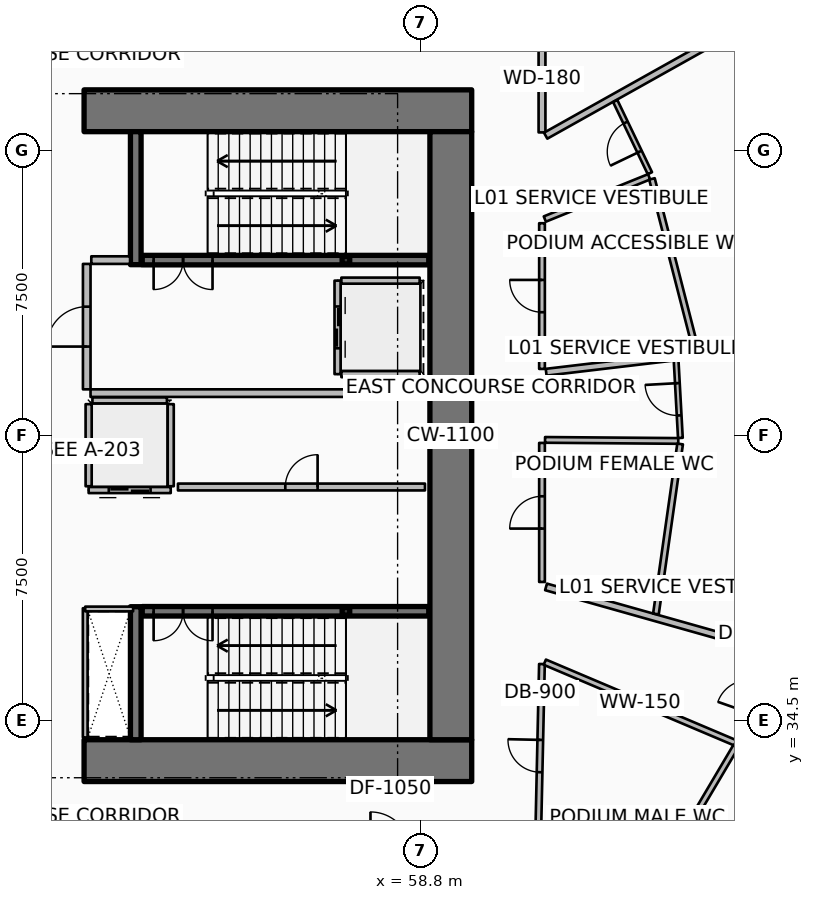
"""IFC4 building model, lengths in metres.
Left out: names, types, materials, properties, quantities, classifications, styles, units other than length and angle.
Written with IfcOpenShell. Run it as: python <this file> out.ifc"""

import sys

from ifc_helpers import new_model, si_unit, direction, frame, frame_2d, origin, origin_2d, place, context, subcontext, project, spatial, rectangle, hollow_rectangle, extrude, element, fill, save


model = new_model("IFC4")
c1 = context("Model", 3, precision=1e-05, world=origin(), true_north=direction((0.0, 1.0)))
c2 = subcontext(c1, "Body", "Model", "MODEL_VIEW")
j1 = project(units=[si_unit("LENGTHUNIT", "METRE"), si_unit("PLANEANGLEUNIT", "RADIAN")], contexts=[c1])
p1 = place(None, origin())
s1 = spatial("IfcSite", under=j1, at=p1, CompositionType="ELEMENT")
p2 = place(p1, origin())
s2 = spatial("IfcBuilding", under=s1, at=p2, CompositionType="ELEMENT")
p3 = place(p2, frame((0.0, 0.0, 7.2)))
s3 = spatial("IfcBuildingStorey", under=s2, at=p3, CompositionType="ELEMENT", Elevation=7.2)
for number, where, z_axis, x_axis in (
    (1, (49.95, 33.45, 0.0), (0.0, 0.0, 1.0), (1.0, 0.0, 0.0)),
    (2, (49.95, 50.55, 0.0), (0.0, 0.0, 1.0), (1.0, 0.0, 0.0)),
):
    element("IfcWall", number, at=place(p3, frame(where, z_axis=z_axis, x_axis=x_axis)), inside=s3, PredefinedType="SHEAR", context=c2, shape_type="SweptSolid", body=[
        extrude(rectangle(XDim=10.2, YDim=1.1, at=frame_2d((5.1, 0.0))), origin(), (0.0, 0.0, 1.0), 4.8),
    ])
p4 = place(p3, frame((59.6, 34.0, 0.0), z_axis=(0.0, 0.0, 1.0), x_axis=(0.0, 1.0, 0.0)))
e3 = element("IfcWall", 3, at=p4, inside=s3, PredefinedType="SHEAR", context=c2, shape_type="SweptSolid", body=[
    extrude(rectangle(XDim=16.0, YDim=1.1, at=frame_2d((8.0, 0.0))), origin(), (0.0, 0.0, 1.0), 4.8),
])
for number, where, z_axis, x_axis in (
    (4, (51.31, 46.5, 0.0), (0.0, 0.0, 1.0), (0.0, 1.0, 0.0)),
    (5, (51.31, 34.0, 0.0), (0.0, 0.0, 1.0), (0.0, 1.0, 0.0)),
):
    element("IfcWall", number, at=place(p3, frame(where, z_axis=z_axis, x_axis=x_axis)), inside=s3, PredefinedType="SHEAR", context=c2, shape_type="SweptSolid", body=[
        extrude(rectangle(XDim=3.5, YDim=0.28, at=frame_2d((1.75, 0.0))), origin(), (0.0, 0.0, 1.0), 4.8),
    ])
for number, where, z_axis, x_axis in (
    (6, (56.84, 46.62, 0.0), (0.0, 0.0, 1.0), (1.0, 0.0, 0.0)),
    (7, (56.84, 37.38, 0.0), (0.0, 0.0, 1.0), (1.0, 0.0, 0.0)),
):
    element("IfcColumn", number, at=place(p3, frame(where, z_axis=z_axis, x_axis=x_axis)), inside=s3, PredefinedType="COLUMN", context=c2, shape_type="SweptSolid", body=[
        extrude(hollow_rectangle(XDim=0.2, YDim=0.2, WallThickness=0.01, InnerFilletRadius=0.01, OuterFilletRadius=0.02, at=origin_2d()), origin(), (0.0, 0.0, 1.0), 2.195),
    ])
p5 = place(p3, frame((51.48, 46.62, 0.0), z_axis=(0.0, 0.0, 1.0), x_axis=(1.0, 0.0, 0.0)))
e8 = element("IfcWall", 8, at=p5, inside=s3, PredefinedType="SOLIDWALL", context=c2, shape_type="SweptSolid", body=[
    extrude(rectangle(XDim=7.54, YDim=0.25, at=frame_2d((3.77, 0.0))), origin(), (0.0, 0.0, 1.0), 4.48),
])
p6 = place(p5, frame((0.3, 0.0, 0.0)))
e9 = element("IfcOpeningElement", 9, at=p6, cuts=e8, PredefinedType="OPENING", context=c2, shape_type="SweptSolid", body=[
    extrude(rectangle(XDim=1.55, YDim=2.15, at=frame_2d((0.775, 1.075))), frame((0.0, 0.135, 0.0), z_axis=(0.0, -1.0, 0.0), x_axis=(1.0, 0.0, 0.0)), (0.0, 0.0, 1.0), 0.27),
])
p7 = place(p3, frame((51.48, 37.38, 0.0), z_axis=(0.0, 0.0, 1.0), x_axis=(1.0, 0.0, 0.0)))
e10 = element("IfcWall", 10, at=p7, inside=s3, PredefinedType="SOLIDWALL", context=c2, shape_type="SweptSolid", body=[
    extrude(rectangle(XDim=7.54, YDim=0.25, at=frame_2d((3.77, 0.0))), origin(), (0.0, 0.0, 1.0), 4.48),
])
p8 = place(p7, frame((0.3, 0.0, 0.0)))
e11 = element("IfcOpeningElement", 11, at=p8, cuts=e10, PredefinedType="OPENING", context=c2, shape_type="SweptSolid", body=[
    extrude(rectangle(XDim=1.55, YDim=2.15, at=frame_2d((0.775, 1.075))), frame((0.0, 0.135, 0.0), z_axis=(0.0, -1.0, 0.0), x_axis=(1.0, 0.0, 0.0)), (0.0, 0.0, 1.0), 0.27),
])
p9 = place(p3, frame((56.62, 46.08, 0.0), z_axis=(0.0, 0.0, 1.0), x_axis=(0.0, -1.0, 0.0)))
e12 = element("IfcWall", 12, at=p9, inside=s3, PredefinedType="PARTITIONING", context=c2, shape_type="SweptSolid", body=[
    extrude(rectangle(XDim=2.46, YDim=0.16, at=frame_2d((1.23, 0.0))), origin(), (0.0, 0.0, 1.0), 4.48),
])
p10 = place(p9, frame((0.68, 0.0, 0.0)))
e13 = element("IfcOpeningElement", 13, at=p10, cuts=e12, PredefinedType="OPENING", context=c2, shape_type="SweptSolid", body=[
    extrude(rectangle(XDim=1.1, YDim=2.1, at=frame_2d((0.55, 1.05))), frame((0.0, 0.09, 0.0), z_axis=(0.0, -1.0, 0.0), x_axis=(1.0, 0.0, 0.0)), (0.0, 0.0, 1.0), 0.18),
])
for number, where, z_axis, x_axis in (
    (14, (56.72, 46.08, 0.0), (0.0, 0.0, 1.0), (1.0, 0.0, 0.0)),
    (15, (56.72, 43.62, 0.0), (0.0, 0.0, 1.0), (1.0, 0.0, 0.0)),
):
    element("IfcWall", number, at=place(p3, frame(where, z_axis=z_axis, x_axis=x_axis)), inside=s3, PredefinedType="PARTITIONING", context=c2, shape_type="SweptSolid", body=[
        extrude(rectangle(XDim=2.06, YDim=0.16, at=frame_2d((1.03, 0.0))), origin(), (0.0, 0.0, 1.0), 4.48),
    ])
p11 = place(p3, frame((52.23, 40.57, 0.0), z_axis=(0.0, 0.0, 1.0), x_axis=(-1.0, 0.0, 0.0)))
e16 = element("IfcWall", 16, at=p11, inside=s3, PredefinedType="PARTITIONING", context=c2, shape_type="SweptSolid", body=[
    extrude(rectangle(XDim=2.16, YDim=0.16, at=frame_2d((1.08, 0.0))), origin(), (0.0, 0.0, 1.0), 4.48),
])
p12 = place(p11, frame((0.53, 0.0, 0.0)))
e17 = element("IfcOpeningElement", 17, at=p12, cuts=e16, PredefinedType="OPENING", context=c2, shape_type="SweptSolid", body=[
    extrude(rectangle(XDim=1.1, YDim=2.1, at=frame_2d((0.55, 1.05))), frame((0.0, 0.09, 0.0), z_axis=(0.0, -1.0, 0.0), x_axis=(1.0, 0.0, 0.0)), (0.0, 0.0, 1.0), 0.18),
])
for number, where, z_axis, x_axis in (
    (18, (52.23, 40.67, 0.0), (0.0, 0.0, 1.0), (0.0, 1.0, 0.0)),
    (19, (50.07, 40.67, 0.0), (0.0, 0.0, 1.0), (0.0, 1.0, 0.0)),
):
    element("IfcWall", number, at=place(p3, frame(where, z_axis=z_axis, x_axis=x_axis)), inside=s3, PredefinedType="PARTITIONING", context=c2, shape_type="SweptSolid", body=[
        extrude(rectangle(XDim=2.16, YDim=0.16, at=frame_2d((1.08, 0.0))), origin(), (0.0, 0.0, 1.0), 4.48),
    ])
p13 = place(p3, frame((50.17, 42.93, 0.0), z_axis=(0.0, 0.0, 1.0), x_axis=(1.0, 0.0, 0.0)))
e20 = element("IfcWall", 20, at=p13, inside=s3, PredefinedType="PARTITIONING", context=c2, shape_type="SweptSolid", body=[
    extrude(rectangle(XDim=1.96, YDim=0.16, at=frame_2d((0.98, 0.0))), origin(), (0.0, 0.0, 1.0), 4.48),
])
p14 = place(p3, frame((52.42, 40.65, 0.0), z_axis=(0.0, 0.0, 1.0), x_axis=(1.0, 0.0, 0.0)))
e21 = element("IfcWall", 21, at=p14, inside=s3, PredefinedType="PARTITIONING", context=c2, shape_type="SweptSolid", body=[
    extrude(rectangle(XDim=6.5, YDim=0.18, at=frame_2d((3.25, 0.0))), origin(), (0.0, 0.0, 1.0), 4.48),
])
p15 = place(p14, frame((2.825, 0.0, 0.0)))
e22 = element("IfcOpeningElement", 22, at=p15, cuts=e21, PredefinedType="OPENING", context=c2, shape_type="SweptSolid", body=[
    extrude(rectangle(XDim=0.85, YDim=2.06, at=frame_2d((0.425, 1.03))), frame((0.0, 0.1, 0.0), z_axis=(0.0, -1.0, 0.0), x_axis=(1.0, 0.0, 0.0)), (0.0, 0.0, 1.0), 0.2),
])
p16 = place(p3, frame((50.12, 43.12, 0.0), z_axis=(0.0, 0.0, 1.0), x_axis=(1.0, 0.0, 0.0)))
e23 = element("IfcWall", 23, at=p16, inside=s3, PredefinedType="PARTITIONING", context=c2, shape_type="SweptSolid", body=[
    extrude(rectangle(XDim=8.88, YDim=0.2, at=frame_2d((4.44, 0.0))), origin(), (0.0, 0.0, 1.0), 4.48),
])
p17 = place(p3, frame((50.14, 46.62, 0.0), z_axis=(0.0, 0.0, 1.0), x_axis=(1.0, 0.0, 0.0)))
e24 = element("IfcWall", 24, at=p17, inside=s3, PredefinedType="PARTITIONING", context=c2, shape_type="SweptSolid", body=[
    extrude(rectangle(XDim=1.02, YDim=0.2, at=frame_2d((0.51, 0.0))), origin(), (0.0, 0.0, 1.0), 4.48),
])
p18 = place(p3, frame((50.02, 43.22, 0.0), z_axis=(0.0, 0.0, 1.0), x_axis=(0.0, 1.0, 0.0)))
e25 = element("IfcWall", 25, at=p18, inside=s3, PredefinedType="PARTITIONING", context=c2, shape_type="SweptSolid", body=[
    extrude(rectangle(XDim=3.3, YDim=0.2, at=frame_2d((1.65, 0.0))), origin(), (0.0, 0.0, 1.0), 4.48),
])
p19 = place(p18, frame((1.125, 0.0, 0.0)))
e26 = element("IfcOpeningElement", 26, at=p19, cuts=e25, PredefinedType="OPENING", context=c2, shape_type="SweptSolid", body=[
    extrude(rectangle(XDim=1.05, YDim=2.1, at=frame_2d((0.525, 1.05))), frame((0.0, 0.11, 0.0), z_axis=(0.0, -1.0, 0.0), x_axis=(1.0, 0.0, 0.0)), (0.0, 0.0, 1.0), 0.22),
])
p20 = place(p3, frame((49.98, 34.06, 0.0), z_axis=(0.0, 0.0, 1.0), x_axis=(0.0, 1.0, 0.0)))
e27 = element("IfcWall", 27, at=p20, inside=s3, PredefinedType="PARTITIONING", context=c2, shape_type="SweptSolid", body=[
    extrude(rectangle(XDim=3.4, YDim=0.125, at=frame_2d((1.7, 0.0))), origin(), (0.0, 0.0, 1.0), 3.92),
])
p21 = place(p3, frame((49.98, 37.44, 0.0), z_axis=(0.0, 0.0, 1.0), x_axis=(1.0, 0.0, 0.0)))
e28 = element("IfcWall", 28, at=p21, inside=s3, PredefinedType="PARTITIONING", context=c2, shape_type="SweptSolid", body=[
    extrude(rectangle(XDim=1.26, YDim=0.125, at=frame_2d((0.63, 0.0))), origin(), (0.0, 0.0, 1.0), 3.92),
])
p22 = place(p3, frame((62.0, 49.98, 0.0), z_axis=(0.0, 0.0, 1.0), x_axis=(0.0, 1.0, 0.0)))
e29 = element("IfcWall", 29, at=p22, inside=s3, PredefinedType="PARTITIONING", context=c2, shape_type="SweptSolid", body=[
    extrude(rectangle(XDim=2.83, YDim=0.18, at=frame_2d((1.415, 0.0))), origin(), (0.0, 0.0, 1.0), 3.693),
])
p23 = place(p3, frame((62.096, 49.894, 0.0), z_axis=(0.0, 0.0, 1.0), x_axis=(0.872490608205, 0.488630881744, 0.0)))
e30 = element("IfcWall", 30, at=p23, inside=s3, PredefinedType="PARTITIONING", context=c2, shape_type="SweptSolid", body=[
    extrude(rectangle(XDim=19.185, YDim=0.18, at=frame_2d((9.592, 0.0))), origin(), (0.0, 0.0, 1.0), 3.693),
])
p24 = place(p3, frame((61.892, 31.15, 0.0), z_axis=(0.0, 0.0, 1.0), x_axis=(0.021928973177, 0.999759531155, 0.0)))
e31 = element("IfcWall", 31, at=p24, inside=s3, PredefinedType="PARTITIONING", context=c2, shape_type="SweptSolid", body=[
    extrude(rectangle(XDim=4.843, YDim=0.15, at=frame_2d((2.421, 0.0))), origin(), (0.0, 0.0, 1.0), 3.693),
])
p25 = place(p24, frame((1.997, 0.0, 0.0)))
e32 = element("IfcOpeningElement", 32, at=p25, cuts=e31, PredefinedType="OPENING", context=c2, shape_type="SweptSolid", body=[
    extrude(rectangle(XDim=0.85, YDim=2.06, at=frame_2d((0.425, 1.03))), frame((0.0, 0.085, 0.0), z_axis=(0.0, -1.0, 0.0), x_axis=(1.0, 0.0, 0.0)), (0.0, 0.0, 1.0), 0.17),
])
p26 = place(p3, frame((62.074, 36.041, 0.0), z_axis=(0.0, 0.0, 1.0), x_axis=(0.920841540816, -0.38993699069, 0.0)))
e33 = element("IfcWall", 33, at=p26, inside=s3, PredefinedType="PARTITIONING", context=c2, shape_type="SweptSolid", body=[
    extrude(rectangle(XDim=5.443, YDim=0.15, at=frame_2d((2.722, 0.0))), origin(), (0.0, 0.0, 1.0), 3.92),
])
p27 = place(p3, frame((64.375, 29.217, 0.0), z_axis=(0.0, 0.0, 1.0), x_axis=(0.509047270842, 0.860738564286, 0.0)))
e34 = element("IfcWall", 34, at=p27, inside=s3, PredefinedType="PARTITIONING", context=c2, shape_type="SweptSolid", body=[
    extrude(rectangle(XDim=5.354, YDim=0.15, at=frame_2d((2.677, 0.0))), origin(), (0.0, 0.0, 1.0), 3.693),
])
p28 = place(p3, frame((62.106, 38.022, 0.0), z_axis=(0.0, 0.0, 1.0), x_axis=(0.962455233657, -0.271440459782, 0.0)))
e35 = element("IfcWall", 35, at=p28, inside=s3, PredefinedType="PARTITIONING", context=c2, shape_type="SweptSolid", body=[
    extrude(rectangle(XDim=19.716, YDim=0.18, at=frame_2d((9.858, 0.0))), origin(), (0.0, 0.0, 1.0), 3.693),
])
p29 = place(p3, frame((62.0, 38.152, 0.0), z_axis=(0.0, 0.0, 1.0), x_axis=(0.0, 1.0, 0.0)))
e36 = element("IfcWall", 36, at=p29, inside=s3, PredefinedType="PARTITIONING", context=c2, shape_type="SweptSolid", body=[
    extrude(rectangle(XDim=3.658, YDim=0.15, at=frame_2d((1.829, 0.0))), origin(), (0.0, 0.0, 1.0), 3.693),
])
p30 = place(p29, frame((1.404, 0.0, 0.0)))
e37 = element("IfcOpeningElement", 37, at=p30, cuts=e36, PredefinedType="OPENING", context=c2, shape_type="SweptSolid", body=[
    extrude(rectangle(XDim=0.85, YDim=2.06, at=frame_2d((0.425, 1.03))), frame((0.0, 0.085, 0.0), z_axis=(0.0, -1.0, 0.0), x_axis=(1.0, 0.0, 0.0)), (0.0, 0.0, 1.0), 0.17),
])
p31 = place(p3, frame((62.08, 41.889, 0.0), z_axis=(0.0, 0.0, 1.0), x_axis=(0.999969031596, -0.007869933178, 0.0)))
e38 = element("IfcWall", 38, at=p31, inside=s3, PredefinedType="PARTITIONING", context=c2, shape_type="SweptSolid", body=[
    extrude(rectangle(XDim=3.505, YDim=0.15, at=frame_2d((1.753, 0.0))), origin(), (0.0, 0.0, 1.0), 3.92),
])
p32 = place(p3, frame((64.998, 37.309, 0.0), z_axis=(0.0, 0.0, 1.0), x_axis=(0.140922059176, 0.990020693338, 0.0)))
e39 = element("IfcWall", 39, at=p32, inside=s3, PredefinedType="PARTITIONING", context=c2, shape_type="SweptSolid", body=[
    extrude(rectangle(XDim=4.518, YDim=0.15, at=frame_2d((2.259, 0.0))), origin(), (0.0, 0.0, 1.0), 3.693),
])
p33 = place(p3, frame((65.641, 41.941, 0.0), z_axis=(0.0, 0.0, 1.0), x_axis=(-0.054918793983, 0.998490824228, 0.0)))
e40 = element("IfcWall", 40, at=p33, inside=s3, PredefinedType="PARTITIONING", context=c2, shape_type="SweptSolid", body=[
    extrude(rectangle(XDim=2.036, YDim=0.125, at=frame_2d((1.018, 0.0))), origin(), (0.0, 0.0, 1.0), 3.693),
])
p34 = place(p33, frame((0.593, 0.0, 0.0)))
e41 = element("IfcOpeningElement", 41, at=p34, cuts=e40, PredefinedType="OPENING", context=c2, shape_type="SweptSolid", body=[
    extrude(rectangle(XDim=0.85, YDim=2.06, at=frame_2d((0.425, 1.03))), frame((0.0, 0.073, 0.0), z_axis=(0.0, -1.0, 0.0), x_axis=(1.0, 0.0, 0.0)), (0.0, 0.0, 1.0), 0.145),
])
p35 = place(p3, frame((62.109, 43.67, 0.0), z_axis=(0.0, 0.0, 1.0), x_axis=(0.993068665713, 0.117535633659, 0.0)))
e42 = element("IfcWall", 42, at=p35, inside=s3, PredefinedType="PARTITIONING", context=c2, shape_type="SweptSolid", body=[
    extrude(rectangle(XDim=21.133, YDim=0.18, at=frame_2d((10.566, 0.0))), origin(), (0.0, 0.0, 1.0), 3.693),
])
p36 = place(p3, frame((62.0, 43.757, 0.0), z_axis=(0.0, 0.0, 1.0), x_axis=(0.0, 1.0, 0.0)))
e43 = element("IfcWall", 43, at=p36, inside=s3, PredefinedType="PARTITIONING", context=c2, shape_type="SweptSolid", body=[
    extrude(rectangle(XDim=3.833, YDim=0.15, at=frame_2d((1.917, 0.0))), origin(), (0.0, 0.0, 1.0), 3.693),
])
p37 = place(p36, frame((1.492, 0.0, 0.0)))
e44 = element("IfcOpeningElement", 44, at=p37, cuts=e43, PredefinedType="OPENING", context=c2, shape_type="SweptSolid", body=[
    extrude(rectangle(XDim=0.85, YDim=2.06, at=frame_2d((0.425, 1.03))), frame((0.0, 0.085, 0.0), z_axis=(0.0, -1.0, 0.0), x_axis=(1.0, 0.0, 0.0)), (0.0, 0.0, 1.0), 0.17),
])
p38 = place(p3, frame((62.074, 47.701, 0.0), z_axis=(0.0, 0.0, 1.0), x_axis=(0.926852538468, 0.375425587747, 0.0)))
e45 = element("IfcWall", 45, at=p38, inside=s3, PredefinedType="PARTITIONING", context=c2, shape_type="SweptSolid", body=[
    extrude(rectangle(XDim=2.96, YDim=0.15, at=frame_2d((1.48, 0.0))), origin(), (0.0, 0.0, 1.0), 3.92),
])
p39 = place(p3, frame((66.054, 44.237, 0.0), z_axis=(0.0, 0.0, 1.0), x_axis=(-0.248710144761, 0.968577959636, 0.0)))
e46 = element("IfcWall", 46, at=p39, inside=s3, PredefinedType="PARTITIONING", context=c2, shape_type="SweptSolid", body=[
    extrude(rectangle(XDim=4.667, YDim=0.15, at=frame_2d((2.333, 0.0))), origin(), (0.0, 0.0, 1.0), 3.693),
])
p40 = place(p3, frame((64.839, 48.906, 0.0), z_axis=(0.0, 0.0, 1.0), x_axis=(-0.432923235959, 0.901430791446, 0.0)))
e47 = element("IfcWall", 47, at=p40, inside=s3, PredefinedType="PARTITIONING", context=c2, shape_type="SweptSolid", body=[
    extrude(rectangle(XDim=2.106, YDim=0.125, at=frame_2d((1.053, 0.0))), origin(), (0.0, 0.0, 1.0), 3.693),
])
p41 = place(p40, frame((0.628, 0.0, 0.0)))
e48 = element("IfcOpeningElement", 48, at=p41, cuts=e47, PredefinedType="OPENING", context=c2, shape_type="SweptSolid", body=[
    extrude(rectangle(XDim=0.85, YDim=2.06, at=frame_2d((0.425, 1.03))), frame((0.0, 0.073, 0.0), z_axis=(0.0, -1.0, 0.0), x_axis=(1.0, 0.0, 0.0)), (0.0, 0.0, 1.0), 0.145),
])
p42 = place(p6, origin())
e49 = element("IfcDoor", 49, at=p42, inside=s3, OperationType="DOUBLE_DOOR_SINGLE_SWING", PredefinedType="DOOR", context=c2, shape_type="SweptSolid", body=[
    extrude(rectangle(XDim=1.55, YDim=2.15, at=frame_2d((0.775, 1.075))), frame((0.0, 0.025, 0.0), z_axis=(0.0, -1.0, 0.0), x_axis=(1.0, 0.0, 0.0)), (0.0, 0.0, 1.0), 0.05),
])
fill(e9, e49)
p43 = place(p8, origin())
e50 = element("IfcDoor", 50, at=p43, inside=s3, OperationType="DOUBLE_DOOR_SINGLE_SWING", PredefinedType="DOOR", context=c2, shape_type="SweptSolid", body=[
    extrude(rectangle(XDim=1.55, YDim=2.15, at=frame_2d((0.775, 1.075))), frame((0.0, 0.025, 0.0), z_axis=(0.0, -1.0, 0.0), x_axis=(1.0, 0.0, 0.0)), (0.0, 0.0, 1.0), 0.05),
])
fill(e11, e50)
p44 = place(p10, origin())
e51 = element("IfcDoor", 51, at=p44, inside=s3, OperationType="DOUBLE_DOOR_SLIDING", PredefinedType="DOOR", context=c2, shape_type="SweptSolid", body=[
    extrude(rectangle(XDim=1.1, YDim=2.1, at=frame_2d((0.55, 1.05))), frame((0.0, 0.025, 0.0), z_axis=(0.0, -1.0, 0.0), x_axis=(1.0, 0.0, 0.0)), (0.0, 0.0, 1.0), 0.05),
])
fill(e13, e51)
p45 = place(p12, origin())
e52 = element("IfcDoor", 52, at=p45, inside=s3, OperationType="DOUBLE_DOOR_SLIDING", PredefinedType="DOOR", context=c2, shape_type="SweptSolid", body=[
    extrude(rectangle(XDim=1.1, YDim=2.1, at=frame_2d((0.55, 1.05))), frame((0.0, 0.025, 0.0), z_axis=(0.0, -1.0, 0.0), x_axis=(1.0, 0.0, 0.0)), (0.0, 0.0, 1.0), 0.05),
])
fill(e17, e52)
p46 = place(p15, origin())
e53 = element("IfcDoor", 53, at=p46, inside=s3, OperationType="SINGLE_SWING_RIGHT", PredefinedType="DOOR", context=c2, shape_type="SweptSolid", body=[
    extrude(rectangle(XDim=0.85, YDim=2.06, at=frame_2d((0.425, 1.03))), frame((0.0, 0.025, 0.0), z_axis=(0.0, -1.0, 0.0), x_axis=(1.0, 0.0, 0.0)), (0.0, 0.0, 1.0), 0.05),
])
fill(e22, e53)
p47 = place(p19, origin())
e54 = element("IfcDoor", 54, at=p47, inside=s3, OperationType="SINGLE_SWING_LEFT", PredefinedType="DOOR", context=c2, shape_type="SweptSolid", body=[
    extrude(rectangle(XDim=1.05, YDim=2.1, at=frame_2d((0.525, 1.05))), frame((0.0, 0.025, 0.0), z_axis=(0.0, -1.0, 0.0), x_axis=(1.0, 0.0, 0.0)), (0.0, 0.0, 1.0), 0.05),
])
fill(e26, e54)
p48 = place(p25, origin())
e55 = element("IfcDoor", 55, at=p48, inside=s3, OperationType="SINGLE_SWING_RIGHT", PredefinedType="DOOR", context=c2, shape_type="SweptSolid", body=[
    extrude(rectangle(XDim=0.85, YDim=2.06, at=frame_2d((0.425, 1.03))), frame((0.0, 0.025, 0.0), z_axis=(0.0, -1.0, 0.0), x_axis=(1.0, 0.0, 0.0)), (0.0, 0.0, 1.0), 0.05),
])
fill(e32, e55)
p49 = place(p30, origin())
e56 = element("IfcDoor", 56, at=p49, inside=s3, OperationType="SINGLE_SWING_LEFT", PredefinedType="DOOR", context=c2, shape_type="SweptSolid", body=[
    extrude(rectangle(XDim=0.85, YDim=2.06, at=frame_2d((0.425, 1.03))), frame((0.0, 0.025, 0.0), z_axis=(0.0, -1.0, 0.0), x_axis=(1.0, 0.0, 0.0)), (0.0, 0.0, 1.0), 0.05),
])
fill(e37, e56)
p50 = place(p34, origin())
e57 = element("IfcDoor", 57, at=p50, inside=s3, OperationType="SINGLE_SWING_RIGHT", PredefinedType="DOOR", context=c2, shape_type="SweptSolid", body=[
    extrude(rectangle(XDim=0.85, YDim=2.06, at=frame_2d((0.425, 1.03))), frame((0.0, 0.025, 0.0), z_axis=(0.0, -1.0, 0.0), x_axis=(1.0, 0.0, 0.0)), (0.0, 0.0, 1.0), 0.05),
])
fill(e41, e57)
p51 = place(p37, origin())
e58 = element("IfcDoor", 58, at=p51, inside=s3, OperationType="SINGLE_SWING_RIGHT", PredefinedType="DOOR", context=c2, shape_type="SweptSolid", body=[
    extrude(rectangle(XDim=0.85, YDim=2.06, at=frame_2d((0.425, 1.03))), frame((0.0, 0.025, 0.0), z_axis=(0.0, -1.0, 0.0), x_axis=(1.0, 0.0, 0.0)), (0.0, 0.0, 1.0), 0.05),
])
fill(e44, e58)
p52 = place(p41, origin())
e59 = element("IfcDoor", 59, at=p52, inside=s3, OperationType="SINGLE_SWING_LEFT", PredefinedType="DOOR", context=c2, shape_type="SweptSolid", body=[
    extrude(rectangle(XDim=0.85, YDim=2.06, at=frame_2d((0.425, 1.03))), frame((0.0, 0.025, 0.0), z_axis=(0.0, -1.0, 0.0), x_axis=(1.0, 0.0, 0.0)), (0.0, 0.0, 1.0), 0.05),
])
fill(e48, e59)
save(model, sys.argv[1])
